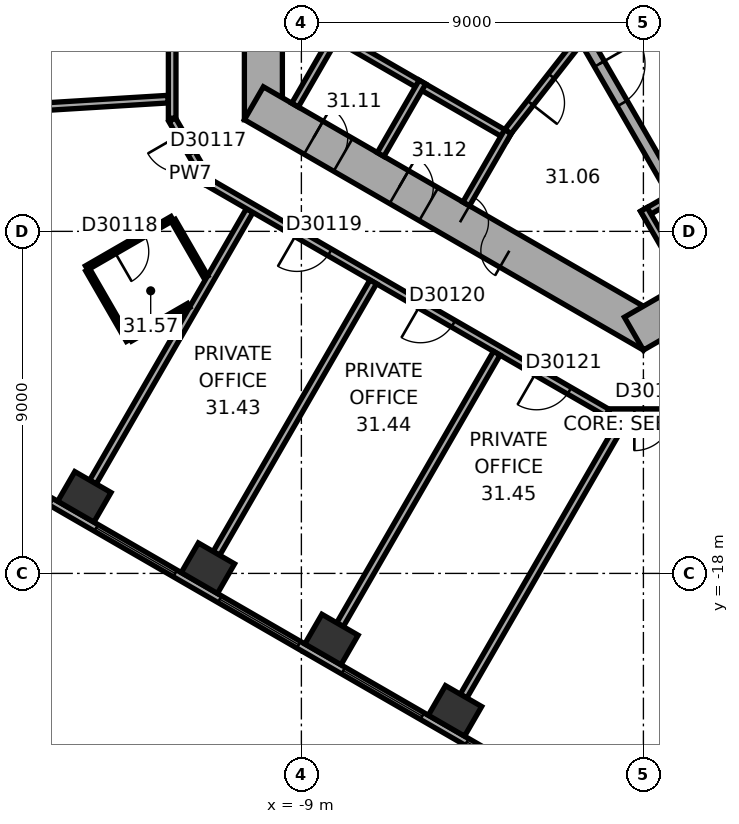
"""IFC4 building model, lengths in metres.
Left out: names, types, materials, properties, quantities, classifications, styles, units other than length and angle.
Written with IfcOpenShell. Run it as: python <this file> out.ifc"""

import sys

from ifc_helpers import new_model, si_unit, direction, frame, frame_2d, origin, origin_2d, place, context, subcontext, project, spatial, rectangle, extrude, element, fill, save


model = new_model("IFC4")
c1 = context("Model", 3, precision=1e-05, world=origin(), true_north=direction((0.0, 1.0)))
c2 = subcontext(c1, "Body", "Model", "MODEL_VIEW")
j1 = project(units=[si_unit("LENGTHUNIT", "METRE"), si_unit("PLANEANGLEUNIT", "RADIAN")], contexts=[c1])
p1 = place(None, origin())
s1 = spatial("IfcSite", under=j1, at=p1, CompositionType="ELEMENT")
p2 = place(p1, origin())
s2 = spatial("IfcBuilding", under=s1, at=p2, CompositionType="ELEMENT")
p3 = place(p2, frame((0.0, 0.0, 128.1)))
s3 = spatial("IfcBuildingStorey", under=s2, at=p3, CompositionType="ELEMENT", Elevation=128.1)
for number, where, z_axis, x_axis in (
    (1, (-14.711, -15.986, 0.0), (0.0, 0.0, 1.0), (0.866, -0.5, 0.0)),
    (2, (-11.46, -17.863, 0.0), (0.0, 0.0, 1.0), (0.866, -0.5, 0.0)),
    (3, (-8.208, -19.74, 0.0), (0.0, 0.0, 1.0), (0.866, -0.5, 0.0)),
    (4, (-4.958, -21.617, 0.0), (0.0, 0.0, 1.0), (0.866, -0.5, 0.0)),
):
    element("IfcColumn", number, at=place(p3, frame(where, z_axis=z_axis, x_axis=x_axis)), inside=s3, PredefinedType="COLUMN", context=c2, shape_type="SweptSolid", body=[
        extrude(rectangle(XDim=1.1, YDim=0.9, at=origin_2d()), origin(), (0.0, 0.0, 1.0), 3.7),
    ])
p4 = place(p3, frame((-10.0, 6.062, 0.0), z_axis=(0.0, 0.0, 1.0), x_axis=(0.0, -1.0, 0.0)))
e5 = element("IfcWall", 5, at=p4, inside=s3, PredefinedType="SHEAR", context=c2, shape_type="SweptSolid", body=[
    extrude(rectangle(XDim=12.125, YDim=1.0, at=frame_2d((6.062, 0.0))), origin(), (0.0, 0.0, 1.0), 3.7),
])
p5 = place(p4, frame((6.612, 0.0, 0.0)))
e6 = element("IfcOpeningElement", 6, at=p5, cuts=e5, PredefinedType="OPENING", context=c2, shape_type="SweptSolid", body=[
    extrude(rectangle(XDim=0.9, YDim=2.1, at=frame_2d((0.45, 1.05))), frame((0.0, 0.51, 0.0), z_axis=(0.0, -1.0, 0.0), x_axis=(1.0, 0.0, 0.0)), (0.0, 0.0, 1.0), 1.02),
])
p6 = place(p3, frame((-10.25, -5.629, 0.0), z_axis=(0.0, 0.0, 1.0), x_axis=(0.866022616891, -0.50000482701, 0.0)))
e7 = element("IfcWall", 7, at=p6, inside=s3, PredefinedType="SHEAR", context=c2, shape_type="SweptSolid", body=[
    extrude(rectangle(XDim=12.125, YDim=1.0, at=frame_2d((6.062, 0.0))), origin(), (0.0, 0.0, 1.0), 3.7),
])
p7 = place(p6, frame((6.262, 0.0, 0.0)))
e8 = element("IfcOpeningElement", 8, at=p7, cuts=e7, PredefinedType="OPENING", context=c2, shape_type="SweptSolid", body=[
    extrude(rectangle(XDim=1.5, YDim=2.1, at=frame_2d((0.75, 1.05))), frame((0.0, 0.51, 0.0), z_axis=(0.0, -1.0, 0.0), x_axis=(1.0, 0.0, 0.0)), (0.0, 0.0, 1.0), 1.02),
])
p8 = place(p6, frame((1.812, 0.0, 0.0)))
e9 = element("IfcOpeningElement", 9, at=p8, cuts=e7, PredefinedType="OPENING", context=c2, shape_type="SweptSolid", body=[
    extrude(rectangle(XDim=0.9, YDim=2.1, at=frame_2d((0.45, 1.05))), frame((0.0, 0.51, 0.0), z_axis=(0.0, -1.0, 0.0), x_axis=(1.0, 0.0, 0.0)), (0.0, 0.0, 1.0), 1.02),
])
p9 = place(p6, frame((4.412, 0.0, 0.0)))
e10 = element("IfcOpeningElement", 10, at=p9, cuts=e7, PredefinedType="OPENING", context=c2, shape_type="SweptSolid", body=[
    extrude(rectangle(XDim=0.9, YDim=2.1, at=frame_2d((0.45, 1.05))), frame((0.0, 0.51, 0.0), z_axis=(0.0, -1.0, 0.0), x_axis=(1.0, 0.0, 0.0)), (0.0, 0.0, 1.0), 1.02),
])
p10 = place(p3, frame((-0.25, -11.691, 0.0), z_axis=(0.0, 0.0, 1.0), x_axis=(0.866022616891, 0.50000482701, 0.0)))
e11 = element("IfcWall", 11, at=p10, inside=s3, PredefinedType="SHEAR", context=c2, shape_type="SweptSolid", body=[
    extrude(rectangle(XDim=12.125, YDim=1.0, at=frame_2d((6.062, 0.0))), origin(), (0.0, 0.0, 1.0), 3.7),
])
p11 = place(p10, frame((4.012, 0.0, 0.0)))
e12 = element("IfcOpeningElement", 12, at=p11, cuts=e11, PredefinedType="OPENING", context=c2, shape_type="SweptSolid", body=[
    extrude(rectangle(XDim=0.9, YDim=2.1, at=frame_2d((0.45, 1.05))), frame((0.0, 0.51, 0.0), z_axis=(0.0, -1.0, 0.0), x_axis=(1.0, 0.0, 0.0)), (0.0, 0.0, 1.0), 1.02),
])
p12 = place(p10, frame((7.812, 0.0, 0.0)))
e13 = element("IfcOpeningElement", 13, at=p12, cuts=e11, PredefinedType="OPENING", context=c2, shape_type="SweptSolid", body=[
    extrude(rectangle(XDim=1.1, YDim=2.1, at=frame_2d((0.55, 1.05))), frame((0.0, 0.51, 0.0), z_axis=(0.0, -1.0, 0.0), x_axis=(1.0, 0.0, 0.0)), (0.0, 0.0, 1.0), 1.02),
])
p13 = place(p3, frame((-18.789, -14.267, 0.0), z_axis=(0.0, 0.0, 1.0), x_axis=(0.866023315909, -0.500003616288, 0.0)))
e14 = element("IfcWall", 14, at=p13, inside=s3, PredefinedType="STANDARD", context=c2, shape_type="SweptSolid", body=[
    extrude(rectangle(XDim=20.044, YDim=0.2, at=frame_2d((10.022, 0.0))), origin(), (0.0, 0.0, 1.0), 3.7),
])
p14 = place(p13, frame((1.314, 0.0, 0.9)))
e15 = element("IfcOpeningElement", 15, at=p14, cuts=e14, PredefinedType="OPENING", context=c2, shape_type="SweptSolid", body=[
    extrude(rectangle(XDim=2.4, YDim=2.0, at=frame_2d((1.2, 1.0))), frame((0.0, 0.11, 0.0), z_axis=(0.0, -1.0, 0.0), x_axis=(1.0, 0.0, 0.0)), (0.0, 0.0, 1.0), 0.22),
])
p15 = place(p13, frame((5.069, 0.0, 0.9)))
e16 = element("IfcOpeningElement", 16, at=p15, cuts=e14, PredefinedType="OPENING", context=c2, shape_type="SweptSolid", body=[
    extrude(rectangle(XDim=2.4, YDim=2.0, at=frame_2d((1.2, 1.0))), frame((0.0, 0.11, 0.0), z_axis=(0.0, -1.0, 0.0), x_axis=(1.0, 0.0, 0.0)), (0.0, 0.0, 1.0), 0.22),
])
p16 = place(p13, frame((8.823, 0.0, 0.9)))
e17 = element("IfcOpeningElement", 17, at=p16, cuts=e14, PredefinedType="OPENING", context=c2, shape_type="SweptSolid", body=[
    extrude(rectangle(XDim=2.4, YDim=2.0, at=frame_2d((1.2, 1.0))), frame((0.0, 0.11, 0.0), z_axis=(0.0, -1.0, 0.0), x_axis=(1.0, 0.0, 0.0)), (0.0, 0.0, 1.0), 0.22),
])
p17 = place(p13, frame((12.577, 0.0, 0.9)))
e18 = element("IfcOpeningElement", 18, at=p17, cuts=e14, PredefinedType="OPENING", context=c2, shape_type="SweptSolid", body=[
    extrude(rectangle(XDim=2.4, YDim=2.0, at=frame_2d((1.2, 1.0))), frame((0.0, 0.11, 0.0), z_axis=(0.0, -1.0, 0.0), x_axis=(1.0, 0.0, 0.0)), (0.0, 0.0, 1.0), 0.22),
])
p18 = place(p13, frame((16.331, 0.0, 0.9)))
e19 = element("IfcOpeningElement", 19, at=p18, cuts=e14, PredefinedType="OPENING", context=c2, shape_type="SweptSolid", body=[
    extrude(rectangle(XDim=2.4, YDim=2.0, at=frame_2d((1.2, 1.0))), frame((0.0, 0.11, 0.0), z_axis=(0.0, -1.0, 0.0), x_axis=(1.0, 0.0, 0.0)), (0.0, 0.0, 1.0), 0.22),
])
p19 = place(p3, frame((-8.203, -3.809, 0.0), z_axis=(0.0, 0.0, 1.0), x_axis=(0.866028230842, -0.499995103361, 0.0)))
e20 = element("IfcWall", 20, at=p19, inside=s3, PredefinedType="PARTITIONING", context=c2, shape_type="SweptSolid", body=[
    extrude(rectangle(XDim=5.4, YDim=0.2, at=frame_2d((2.7, 0.0))), origin(), (0.0, 0.0, 1.0), 3.42),
])
for number, where, z_axis, x_axis in (
    (21, (-8.067, -3.772, 0.0), (0.0, 0.0, 1.0), (-0.5, -0.866, 0.0)),
    (22, (-5.815, -5.072, 0.0), (0.0, 0.0, 1.0), (-0.5, -0.866, 0.0)),
):
    element("IfcWall", number, at=place(p3, frame(where, z_axis=z_axis, x_axis=x_axis)), inside=s3, PredefinedType="PARTITIONING", context=c2, shape_type="SweptSolid", body=[
        extrude(rectangle(XDim=2.2, YDim=0.2, at=frame_2d((1.1, 0.0))), origin(), (0.0, 0.0, 1.0), 3.42),
    ])
p20 = place(p3, frame((-3.563, -6.372, 0.0), z_axis=(0.0, 0.0, 1.0), x_axis=(-0.499994660107, -0.866028486751, 0.0)))
e23 = element("IfcWall", 23, at=p20, inside=s3, PredefinedType="PARTITIONING", context=c2, shape_type="SweptSolid", body=[
    extrude(rectangle(XDim=2.2, YDim=0.2, at=frame_2d((1.1, 0.0))), origin(), (0.0, 0.0, 1.0), 3.42),
])
p21 = place(p3, frame((-0.024, -8.559, 0.0), z_axis=(0.0, 0.0, 1.0), x_axis=(0.866026010844, 0.49999894854, 0.0)))
e24 = element("IfcWall", 24, at=p21, inside=s3, PredefinedType="PARTITIONING", context=c2, shape_type="SweptSolid", body=[
    extrude(rectangle(XDim=8.0, YDim=0.2, at=frame_2d((4.0, 0.0))), origin(), (0.0, 0.0, 1.0), 3.42),
])
p22 = place(p3, frame((0.013, -8.422, 0.0), z_axis=(0.0, 0.0, 1.0), x_axis=(0.500077893725, -0.86598042715, 0.0)))
e25 = element("IfcWall", 25, at=p22, inside=s3, PredefinedType="PARTITIONING", context=c2, shape_type="SweptSolid", body=[
    extrude(rectangle(XDim=2.2, YDim=0.2, at=frame_2d((1.1, 0.0))), origin(), (0.0, 0.0, 1.0), 3.42),
])
p23 = place(p3, frame((-1.558, -3.902, 0.0), z_axis=(0.0, 0.0, 1.0), x_axis=(0.499977259774, -0.866038532462, 0.0)))
e26 = element("IfcWall", 26, at=p23, inside=s3, PredefinedType="SHEAR", context=c2, shape_type="SweptSolid", body=[
    extrude(rectangle(XDim=4.7, YDim=0.3, at=frame_2d((2.35, 0.0))), origin(), (0.0, 0.0, 1.0), 3.42),
])
p24 = place(p23, frame((0.8, 0.0, 0.0)))
e27 = element("IfcOpeningElement", 27, at=p24, cuts=e26, PredefinedType="OPENING", context=c2, shape_type="SweptSolid", body=[
    extrude(rectangle(XDim=1.2, YDim=2.1, at=frame_2d((0.6, 1.05))), frame((0.0, 0.16, 0.0), z_axis=(0.0, -1.0, 0.0), x_axis=(1.0, 0.0, 0.0)), (0.0, 0.0, 1.0), 0.32),
])
p25 = place(p3, frame((-1.712, -4.008, 0.0), z_axis=(0.0, 0.0, 1.0), x_axis=(-0.616549420702, -0.787316208287, 0.0)))
e28 = element("IfcWall", 28, at=p25, inside=s3, PredefinedType="PARTITIONING", context=c2, shape_type="SweptSolid", body=[
    extrude(rectangle(XDim=3.002, YDim=0.2, at=frame_2d((1.501, 0.0))), origin(), (0.0, 0.0, 1.0), 3.42),
])
p26 = place(p25, frame((1.15, 0.0, 0.0)))
e29 = element("IfcOpeningElement", 29, at=p26, cuts=e28, PredefinedType="OPENING", context=c2, shape_type="SweptSolid", body=[
    extrude(rectangle(XDim=0.9, YDim=2.1, at=frame_2d((0.45, 1.05))), frame((0.0, 0.11, 0.0), z_axis=(0.0, -1.0, 0.0), x_axis=(1.0, 0.0, 0.0)), (0.0, 0.0, 1.0), 0.22),
])
p27 = place(p3, frame((-20.421, -6.005, 0.0), z_axis=(0.0, 0.0, 1.0), x_axis=(0.998134865741, 0.061047438866, 0.0)))
e30 = element("IfcWall", 30, at=p27, inside=s3, PredefinedType="PARTITIONING", context=c2, shape_type="SweptSolid", body=[
    extrude(rectangle(XDim=7.927, YDim=0.2, at=frame_2d((3.963, 0.0))), origin(), (0.0, 0.0, 1.0), 2.87),
])
p28 = place(p3, frame((-14.653, -9.961, 0.0), z_axis=(0.0, 0.0, 1.0), x_axis=(0.866021400173, 0.500006934395, 0.0)))
e31 = element("IfcWall", 31, at=p28, inside=s3, PredefinedType="PARTITIONING", context=c2, shape_type="SweptSolid", body=[
    extrude(rectangle(XDim=2.6, YDim=0.12, at=frame_2d((1.3, 0.0))), origin(), (0.0, 0.0, 1.0), 3.42),
])
p29 = place(p28, frame((0.85, 0.0, 0.0)))
e32 = element("IfcOpeningElement", 32, at=p29, cuts=e31, PredefinedType="OPENING", context=c2, shape_type="SweptSolid", body=[
    extrude(rectangle(XDim=0.9, YDim=2.1, at=frame_2d((0.45, 1.05))), frame((0.0, 0.07, 0.0), z_axis=(0.0, -1.0, 0.0), x_axis=(1.0, 0.0, 0.0)), (0.0, 0.0, 1.0), 0.14),
])
p30 = place(p3, frame((-14.486, -15.597, 0.0), z_axis=(0.0, 0.0, 1.0), x_axis=(0.499996545922, 0.866027397988, 0.0)))
e33 = element("IfcWall", 33, at=p30, inside=s3, PredefinedType="PARTITIONING", context=c2, shape_type="SweptSolid", body=[
    extrude(rectangle(XDim=8.25, YDim=0.2, at=frame_2d((4.125, 0.0))), origin(), (0.0, 0.0, 1.0), 3.42),
])
p31 = place(p3, frame((-13.552, -11.866, 0.0), z_axis=(0.0, 0.0, 1.0), x_axis=(-0.500028586798, 0.86600889856, 0.0)))
e34 = element("IfcWall", 34, at=p31, inside=s3, PredefinedType="PARTITIONING", context=c2, shape_type="SweptSolid", body=[
    extrude(rectangle(XDim=2.14, YDim=0.12, at=frame_2d((1.07, 0.0))), origin(), (0.0, 0.0, 1.0), 3.42),
])
p32 = place(p3, frame((-12.4, -6.062, 0.0), z_axis=(0.0, 0.0, 1.0), x_axis=(0.500022797313, -0.86601224135, 0.0)))
e35 = element("IfcWall", 35, at=p32, inside=s3, PredefinedType="PARTITIONING", context=c2, shape_type="SweptSolid", body=[
    extrude(rectangle(XDim=1.9, YDim=0.2, at=frame_2d((0.95, 0.0))), origin(), (0.0, 0.0, 1.0), 3.42),
])
p33 = place(p32, frame((0.45, 0.0, 0.0)))
e36 = element("IfcOpeningElement", 36, at=p33, cuts=e35, PredefinedType="OPENING", context=c2, shape_type="SweptSolid", body=[
    extrude(rectangle(XDim=1.0, YDim=2.1, at=frame_2d((0.5, 1.05))), frame((0.0, 0.11, 0.0), z_axis=(0.0, -1.0, 0.0), x_axis=(1.0, 0.0, 0.0)), (0.0, 0.0, 1.0), 0.22),
])
p34 = place(p3, frame((-12.4, 5.769, 0.0), z_axis=(0.0, 0.0, 1.0), x_axis=(0.0, -1.0, 0.0)))
e37 = element("IfcWall", 37, at=p34, inside=s3, PredefinedType="PARTITIONING", context=c2, shape_type="SweptSolid", body=[
    extrude(rectangle(XDim=11.792, YDim=0.2, at=frame_2d((5.896, 0.0))), origin(), (0.0, 0.0, 1.0), 3.42),
])
p35 = place(p34, frame((6.267, 0.0, 0.0)))
e38 = element("IfcOpeningElement", 38, at=p35, cuts=e37, PredefinedType="OPENING", context=c2, shape_type="SweptSolid", body=[
    extrude(rectangle(XDim=1.0, YDim=2.1, at=frame_2d((0.5, 1.05))), frame((0.0, 0.11, 0.0), z_axis=(0.0, -1.0, 0.0), x_axis=(1.0, 0.0, 0.0)), (0.0, 0.0, 1.0), 0.22),
])
p36 = place(p3, frame((-12.371, -8.713, 0.0), z_axis=(0.0, 0.0, 1.0), x_axis=(0.499910907645, -0.86607683517, 0.0)))
e39 = element("IfcWall", 39, at=p36, inside=s3, PredefinedType="PARTITIONING", context=c2, shape_type="SweptSolid", body=[
    extrude(rectangle(XDim=1.719, YDim=0.12, at=frame_2d((0.86, 0.0))), origin(), (0.0, 0.0, 1.0), 3.42),
])
p37 = place(p3, frame((-11.964, -10.949, 0.0), z_axis=(0.0, 0.0, 1.0), x_axis=(-0.86600680221, -0.500032217487, 0.0)))
e40 = element("IfcWall", 40, at=p37, inside=s3, PredefinedType="PARTITIONING", context=c2, shape_type="SweptSolid", body=[
    extrude(rectangle(XDim=1.774, YDim=0.12, at=frame_2d((0.887, 0.0))), origin(), (0.0, 0.0, 1.0), 3.42),
])
p38 = place(p3, frame((-11.415, -7.728, 0.0), z_axis=(0.0, 0.0, 1.0), x_axis=(0.866022749921, -0.500004596598, 0.0)))
e41 = element("IfcWall", 41, at=p38, inside=s3, PredefinedType="PARTITIONING", context=c2, shape_type="SweptSolid", body=[
    extrude(rectangle(XDim=12.084, YDim=0.2, at=frame_2d((6.042, 0.0))), origin(), (0.0, 0.0, 1.0), 3.42),
])
p39 = place(p38, frame((2.652, 0.0, 0.0)))
e42 = element("IfcOpeningElement", 42, at=p39, cuts=e41, PredefinedType="OPENING", context=c2, shape_type="SweptSolid", body=[
    extrude(rectangle(XDim=1.0, YDim=2.1, at=frame_2d((0.5, 1.05))), frame((0.0, 0.11, 0.0), z_axis=(0.0, -1.0, 0.0), x_axis=(1.0, 0.0, 0.0)), (0.0, 0.0, 1.0), 0.22),
])
p40 = place(p38, frame((6.406, 0.0, 0.0)))
e43 = element("IfcOpeningElement", 43, at=p40, cuts=e41, PredefinedType="OPENING", context=c2, shape_type="SweptSolid", body=[
    extrude(rectangle(XDim=1.0, YDim=2.1, at=frame_2d((0.5, 1.05))), frame((0.0, 0.11, 0.0), z_axis=(0.0, -1.0, 0.0), x_axis=(1.0, 0.0, 0.0)), (0.0, 0.0, 1.0), 0.22),
])
p41 = place(p38, frame((9.934, 0.0, 0.0)))
e44 = element("IfcOpeningElement", 44, at=p41, cuts=e41, PredefinedType="OPENING", context=c2, shape_type="SweptSolid", body=[
    extrude(rectangle(XDim=1.0, YDim=2.1, at=frame_2d((0.5, 1.05))), frame((0.0, 0.11, 0.0), z_axis=(0.0, -1.0, 0.0), x_axis=(1.0, 0.0, 0.0)), (0.0, 0.0, 1.0), 0.22),
])
p42 = place(p3, frame((-11.235, -17.474, 0.0), z_axis=(0.0, 0.0, 1.0), x_axis=(0.499996545922, 0.866027397988, 0.0)))
e45 = element("IfcWall", 45, at=p42, inside=s3, PredefinedType="PARTITIONING", context=c2, shape_type="SweptSolid", body=[
    extrude(rectangle(XDim=8.25, YDim=0.2, at=frame_2d((4.125, 0.0))), origin(), (0.0, 0.0, 1.0), 2.87),
])
p43 = place(p3, frame((-7.984, -19.351, 0.0), z_axis=(0.0, 0.0, 1.0), x_axis=(0.500009360108, 0.866019999656, 0.0)))
e46 = element("IfcWall", 46, at=p43, inside=s3, PredefinedType="PARTITIONING", context=c2, shape_type="SweptSolid", body=[
    extrude(rectangle(XDim=8.25, YDim=0.2, at=frame_2d((4.125, 0.0))), origin(), (0.0, 0.0, 1.0), 3.42),
])
p44 = place(p3, frame((-4.732, -21.228, 0.0), z_axis=(0.0, 0.0, 1.0), x_axis=(0.500000843414, 0.866024916838, 0.0)))
e47 = element("IfcWall", 47, at=p44, inside=s3, PredefinedType="PARTITIONING", context=c2, shape_type="SweptSolid", body=[
    extrude(rectangle(XDim=8.452, YDim=0.2, at=frame_2d((4.226, 0.0))), origin(), (0.0, 0.0, 1.0), 3.42),
])
p45 = place(p3, frame((-0.91, -13.77, 0.0), z_axis=(0.0, 0.0, 1.0), x_axis=(1.0, 0.0, 0.0)))
e48 = element("IfcWall", 48, at=p45, inside=s3, PredefinedType="PARTITIONING", context=c2, shape_type="SweptSolid", body=[
    extrude(rectangle(XDim=1.86, YDim=0.2, at=frame_2d((0.93, 0.0))), origin(), (0.0, 0.0, 1.0), 3.42),
])
p46 = place(p45, frame((0.672, 0.0, 0.0)))
e49 = element("IfcOpeningElement", 49, at=p46, cuts=e48, PredefinedType="OPENING", context=c2, shape_type="SweptSolid", body=[
    extrude(rectangle(XDim=1.0, YDim=2.1, at=frame_2d((0.5, 1.05))), frame((0.0, 0.11, 0.0), z_axis=(0.0, -1.0, 0.0), x_axis=(1.0, 0.0, 0.0)), (0.0, 0.0, 1.0), 0.22),
])
p47 = place(p14, origin())
e50 = element("IfcWindow", 50, at=p47, inside=s3, PartitioningType="SINGLE_PANEL", PredefinedType="WINDOW", context=c2, shape_type="SweptSolid", body=[
    extrude(rectangle(XDim=2.4, YDim=2.0, at=frame_2d((1.2, 1.0))), frame((0.0, 0.03, 0.0), z_axis=(0.0, -1.0, 0.0), x_axis=(1.0, 0.0, 0.0)), (0.0, 0.0, 1.0), 0.06),
])
fill(e15, e50)
p48 = place(p15, origin())
e51 = element("IfcWindow", 51, at=p48, inside=s3, PartitioningType="SINGLE_PANEL", PredefinedType="WINDOW", context=c2, shape_type="SweptSolid", body=[
    extrude(rectangle(XDim=2.4, YDim=2.0, at=frame_2d((1.2, 1.0))), frame((0.0, 0.03, 0.0), z_axis=(0.0, -1.0, 0.0), x_axis=(1.0, 0.0, 0.0)), (0.0, 0.0, 1.0), 0.06),
])
fill(e16, e51)
p49 = place(p16, origin())
e52 = element("IfcWindow", 52, at=p49, inside=s3, PartitioningType="SINGLE_PANEL", PredefinedType="WINDOW", context=c2, shape_type="SweptSolid", body=[
    extrude(rectangle(XDim=2.4, YDim=2.0, at=frame_2d((1.2, 1.0))), frame((0.0, 0.03, 0.0), z_axis=(0.0, -1.0, 0.0), x_axis=(1.0, 0.0, 0.0)), (0.0, 0.0, 1.0), 0.06),
])
fill(e17, e52)
p50 = place(p17, origin())
e53 = element("IfcWindow", 53, at=p50, inside=s3, PartitioningType="SINGLE_PANEL", PredefinedType="WINDOW", context=c2, shape_type="SweptSolid", body=[
    extrude(rectangle(XDim=2.4, YDim=2.0, at=frame_2d((1.2, 1.0))), frame((0.0, 0.03, 0.0), z_axis=(0.0, -1.0, 0.0), x_axis=(1.0, 0.0, 0.0)), (0.0, 0.0, 1.0), 0.06),
])
fill(e18, e53)
p51 = place(p18, origin())
e54 = element("IfcWindow", 54, at=p51, inside=s3, PartitioningType="SINGLE_PANEL", PredefinedType="WINDOW", context=c2, shape_type="SweptSolid", body=[
    extrude(rectangle(XDim=2.4, YDim=2.0, at=frame_2d((1.2, 1.0))), frame((0.0, 0.03, 0.0), z_axis=(0.0, -1.0, 0.0), x_axis=(1.0, 0.0, 0.0)), (0.0, 0.0, 1.0), 0.06),
])
fill(e19, e54)
p52 = place(p7, origin())
e55 = element("IfcDoor", 55, at=p52, inside=s3, OperationType="DOUBLE_DOOR_SINGLE_SWING", PredefinedType="DOOR", context=c2, shape_type="SweptSolid", body=[
    extrude(rectangle(XDim=1.5, YDim=2.1, at=frame_2d((0.75, 1.05))), frame((0.0, 0.025, 0.0), z_axis=(0.0, -1.0, 0.0), x_axis=(1.0, 0.0, 0.0)), (0.0, 0.0, 1.0), 0.05),
])
fill(e8, e55)
p53 = place(p24, origin())
e56 = element("IfcDoor", 56, at=p53, inside=s3, OperationType="SINGLE_SWING_RIGHT", PredefinedType="DOOR", context=c2, shape_type="SweptSolid", body=[
    extrude(rectangle(XDim=1.2, YDim=2.1, at=frame_2d((0.6, 1.05))), frame((0.0, 0.025, 0.0), z_axis=(0.0, -1.0, 0.0), x_axis=(1.0, 0.0, 0.0)), (0.0, 0.0, 1.0), 0.05),
])
fill(e27, e56)
p54 = place(p26, origin())
e57 = element("IfcDoor", 57, at=p54, inside=s3, OperationType="SINGLE_SWING_LEFT", PredefinedType="DOOR", context=c2, shape_type="SweptSolid", body=[
    extrude(rectangle(XDim=0.9, YDim=2.1, at=frame_2d((0.45, 1.05))), frame((0.0, 0.025, 0.0), z_axis=(0.0, -1.0, 0.0), x_axis=(1.0, 0.0, 0.0)), (0.0, 0.0, 1.0), 0.05),
])
fill(e29, e57)
p55 = place(p8, origin())
e58 = element("IfcDoor", 58, at=p55, inside=s3, OperationType="SINGLE_SWING_LEFT", PredefinedType="DOOR", context=c2, shape_type="SweptSolid", body=[
    extrude(rectangle(XDim=0.9, YDim=2.1, at=frame_2d((0.45, 1.05))), frame((0.0, 0.025, 0.0), z_axis=(0.0, -1.0, 0.0), x_axis=(1.0, 0.0, 0.0)), (0.0, 0.0, 1.0), 0.05),
])
fill(e9, e58)
p56 = place(p9, origin())
e59 = element("IfcDoor", 59, at=p56, inside=s3, OperationType="SINGLE_SWING_LEFT", PredefinedType="DOOR", context=c2, shape_type="SweptSolid", body=[
    extrude(rectangle(XDim=0.9, YDim=2.1, at=frame_2d((0.45, 1.05))), frame((0.0, 0.025, 0.0), z_axis=(0.0, -1.0, 0.0), x_axis=(1.0, 0.0, 0.0)), (0.0, 0.0, 1.0), 0.05),
])
fill(e10, e59)
p57 = place(p33, origin())
e60 = element("IfcDoor", 60, at=p57, inside=s3, OperationType="SINGLE_SWING_LEFT", PredefinedType="DOOR", context=c2, shape_type="SweptSolid", body=[
    extrude(rectangle(XDim=1.0, YDim=2.1, at=frame_2d((0.5, 1.05))), frame((0.0, 0.025, 0.0), z_axis=(0.0, -1.0, 0.0), x_axis=(1.0, 0.0, 0.0)), (0.0, 0.0, 1.0), 0.05),
])
fill(e36, e60)
p58 = place(p29, origin())
e61 = element("IfcDoor", 61, at=p58, inside=s3, OperationType="SINGLE_SWING_LEFT", PredefinedType="DOOR", context=c2, shape_type="SweptSolid", body=[
    extrude(rectangle(XDim=0.9, YDim=2.1, at=frame_2d((0.45, 1.05))), frame((0.0, 0.025, 0.0), z_axis=(0.0, -1.0, 0.0), x_axis=(1.0, 0.0, 0.0)), (0.0, 0.0, 1.0), 0.05),
])
fill(e32, e61)
p59 = place(p39, origin())
e62 = element("IfcDoor", 62, at=p59, inside=s3, OperationType="SINGLE_SWING_LEFT", PredefinedType="DOOR", context=c2, shape_type="SweptSolid", body=[
    extrude(rectangle(XDim=1.0, YDim=2.1, at=frame_2d((0.5, 1.05))), frame((0.0, 0.025, 0.0), z_axis=(0.0, -1.0, 0.0), x_axis=(1.0, 0.0, 0.0)), (0.0, 0.0, 1.0), 0.05),
])
fill(e42, e62)
p60 = place(p40, origin())
e63 = element("IfcDoor", 63, at=p60, inside=s3, OperationType="SINGLE_SWING_LEFT", PredefinedType="DOOR", context=c2, shape_type="SweptSolid", body=[
    extrude(rectangle(XDim=1.0, YDim=2.1, at=frame_2d((0.5, 1.05))), frame((0.0, 0.025, 0.0), z_axis=(0.0, -1.0, 0.0), x_axis=(1.0, 0.0, 0.0)), (0.0, 0.0, 1.0), 0.05),
])
fill(e43, e63)
p61 = place(p41, origin())
e64 = element("IfcDoor", 64, at=p61, inside=s3, OperationType="SINGLE_SWING_LEFT", PredefinedType="DOOR", context=c2, shape_type="SweptSolid", body=[
    extrude(rectangle(XDim=1.0, YDim=2.1, at=frame_2d((0.5, 1.05))), frame((0.0, 0.025, 0.0), z_axis=(0.0, -1.0, 0.0), x_axis=(1.0, 0.0, 0.0)), (0.0, 0.0, 1.0), 0.05),
])
fill(e44, e64)
p62 = place(p46, origin())
e65 = element("IfcDoor", 65, at=p62, inside=s3, OperationType="SINGLE_SWING_LEFT", PredefinedType="DOOR", context=c2, shape_type="SweptSolid", body=[
    extrude(rectangle(XDim=1.0, YDim=2.1, at=frame_2d((0.5, 1.05))), frame((0.0, 0.025, 0.0), z_axis=(0.0, -1.0, 0.0), x_axis=(1.0, 0.0, 0.0)), (0.0, 0.0, 1.0), 0.05),
])
fill(e49, e65)
save(model, sys.argv[1])
